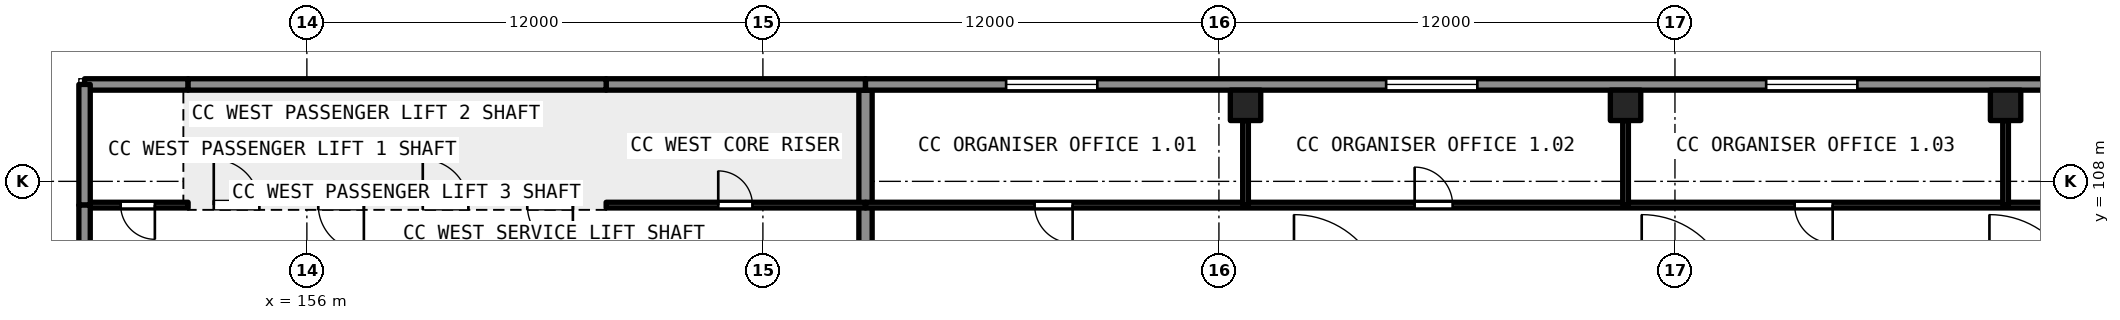
"""IFC4 building model, lengths in metres.
Left out: names, types, materials, properties, quantities, classifications, styles, units other than length and angle.
Written with IfcOpenShell. Run it as: python <this file> out.ifc"""

import sys

from ifc_helpers import new_model, si_unit, direction, frame, frame_2d, origin, origin_2d, place, context, subcontext, project, spatial, rectangle, extrude, element, fill, save


model = new_model("IFC4")
c1 = context("Model", 3, precision=1e-05, world=origin(), true_north=direction((0.0, 1.0)))
c2 = subcontext(c1, "Body", "Model", "MODEL_VIEW")
j1 = project(units=[si_unit("LENGTHUNIT", "METRE"), si_unit("PLANEANGLEUNIT", "RADIAN")], contexts=[c1])
p1 = place(None, origin())
s1 = spatial("IfcSite", under=j1, at=p1, CompositionType="ELEMENT")
p2 = place(p1, origin())
s2 = spatial("IfcBuilding", under=s1, at=p2, CompositionType="ELEMENT")
p3 = place(p2, frame((0.0, 0.0, 9.0)))
s3 = spatial("IfcBuildingStorey", under=s2, at=p3, CompositionType="ELEMENT", Elevation=9.0)
for number, where, z_axis, x_axis in (
    (1, (180.7, 110.0, 0.0), (0.0, 0.0, 1.0), (1.0, 0.0, 0.0)),
    (2, (190.7, 110.0, 0.0), (0.0, 0.0, 1.0), (1.0, 0.0, 0.0)),
    (3, (200.7, 110.0, 0.0), (0.0, 0.0, 1.0), (1.0, 0.0, 0.0)),
):
    element("IfcColumn", number, at=place(p3, frame(where, z_axis=z_axis, x_axis=x_axis)), inside=s3, PredefinedType="COLUMN", context=c2, shape_type="SweptSolid", body=[
        extrude(rectangle(XDim=0.8, YDim=0.8, at=origin_2d()), origin(), (0.0, 0.0, 1.0), 6.0),
    ])
p4 = place(p3, frame((170.7, 103.15, 0.0), z_axis=(0.0, 0.0, 1.0), x_axis=(0.0, 1.0, 0.0)))
e4 = element("IfcWall", 4, at=p4, inside=s3, PredefinedType="SHEAR", context=c2, shape_type="SweptSolid", body=[
    extrude(rectangle(XDim=7.25, YDim=0.35, at=frame_2d((3.625, 0.0))), origin(), (0.0, 0.0, 1.0), 5.59),
])
p5 = place(p4, frame((1.2, 0.0, 0.0)))
e5 = element("IfcOpeningElement", 5, at=p5, cuts=e4, PredefinedType="OPENING", context=c2, shape_type="SweptSolid", body=[
    extrude(rectangle(XDim=1.8, YDim=2.1, at=frame_2d((0.9, 1.05))), frame((0.0, 0.186, 0.0), z_axis=(0.0, -1.0, 0.0), x_axis=(1.0, 0.0, 0.0)), (0.0, 0.0, 1.0), 0.371),
])
p6 = place(p2, origin())
s4 = spatial("IfcBuildingStorey", under=s2, at=p6, CompositionType="ELEMENT", Elevation=0.0)
for number, where, z_axis, x_axis in (
    (6, (152.875, 107.375, -1.2), (0.0, 0.0, 1.0), (0.0, 1.0, 0.0)),
    (7, (155.625, 107.375, -1.2), (0.0, 0.0, 1.0), (0.0, 1.0, 0.0)),
    (8, (158.375, 107.375, -1.2), (0.0, 0.0, 1.0), (0.0, 1.0, 0.0)),
    (9, (161.125, 107.375, -1.2), (0.0, 0.0, 1.0), (0.0, 1.0, 0.0)),
    (10, (163.875, 107.375, -1.2), (0.0, 0.0, 1.0), (0.0, 1.0, 0.0)),
):
    element("IfcWall", number, at=place(p6, frame(where, z_axis=z_axis, x_axis=x_axis)), inside=s4, PredefinedType="SHEAR", context=c2, shape_type="SweptSolid", body=[
        extrude(rectangle(XDim=3.025, YDim=0.25, at=frame_2d((1.512, 0.0))), origin(), (0.0, 0.0, 1.0), 30.79),
    ])
p7 = place(p6, frame((163.875, 107.375, -1.2), z_axis=(0.0, 0.0, 1.0), x_axis=(-1.0, 0.0, 0.0)))
e11 = element("IfcWall", 11, at=p7, inside=s4, PredefinedType="SHEAR", context=c2, shape_type="SweptSolid", body=[
    extrude(rectangle(XDim=11.0, YDim=0.25, at=frame_2d((5.5, 0.0))), origin(), (0.0, 0.0, 1.0), 30.79),
])
p8 = place(p7, frame((9.125, 0.0, 1.2)))
e12 = element("IfcOpeningElement", 12, at=p8, cuts=e11, PredefinedType="OPENING", context=c2, shape_type="SweptSolid", body=[
    extrude(rectangle(XDim=1.2, YDim=2.1, at=frame_2d((0.6, 1.05))), frame((0.0, 0.135, 0.0), z_axis=(0.0, -1.0, 0.0), x_axis=(1.0, 0.0, 0.0)), (0.0, 0.0, 1.0), 0.271),
])
p9 = place(p7, frame((6.375, 0.0, 1.2)))
e13 = element("IfcOpeningElement", 13, at=p9, cuts=e11, PredefinedType="OPENING", context=c2, shape_type="SweptSolid", body=[
    extrude(rectangle(XDim=1.2, YDim=2.1, at=frame_2d((0.6, 1.05))), frame((0.0, 0.135, 0.0), z_axis=(0.0, -1.0, 0.0), x_axis=(1.0, 0.0, 0.0)), (0.0, 0.0, 1.0), 0.271),
])
p10 = place(p7, frame((3.625, 0.0, 1.2)))
e14 = element("IfcOpeningElement", 14, at=p10, cuts=e11, PredefinedType="OPENING", context=c2, shape_type="SweptSolid", body=[
    extrude(rectangle(XDim=1.2, YDim=2.1, at=frame_2d((0.6, 1.05))), frame((0.0, 0.135, 0.0), z_axis=(0.0, -1.0, 0.0), x_axis=(1.0, 0.0, 0.0)), (0.0, 0.0, 1.0), 0.271),
])
p11 = place(p7, frame((0.875, 0.0, 1.2)))
e15 = element("IfcOpeningElement", 15, at=p11, cuts=e11, PredefinedType="OPENING", context=c2, shape_type="SweptSolid", body=[
    extrude(rectangle(XDim=1.2, YDim=2.1, at=frame_2d((0.6, 1.05))), frame((0.0, 0.135, 0.0), z_axis=(0.0, -1.0, 0.0), x_axis=(1.0, 0.0, 0.0)), (0.0, 0.0, 1.0), 0.271),
])
p12 = place(p7, frame((9.125, 0.0, 10.2)))
e16 = element("IfcOpeningElement", 16, at=p12, cuts=e11, PredefinedType="OPENING", context=c2, shape_type="SweptSolid", body=[
    extrude(rectangle(XDim=1.2, YDim=2.1, at=frame_2d((0.6, 1.05))), frame((0.0, 0.135, 0.0), z_axis=(0.0, -1.0, 0.0), x_axis=(1.0, 0.0, 0.0)), (0.0, 0.0, 1.0), 0.271),
])
p13 = place(p7, frame((6.375, 0.0, 10.2)))
e17 = element("IfcOpeningElement", 17, at=p13, cuts=e11, PredefinedType="OPENING", context=c2, shape_type="SweptSolid", body=[
    extrude(rectangle(XDim=1.2, YDim=2.1, at=frame_2d((0.6, 1.05))), frame((0.0, 0.135, 0.0), z_axis=(0.0, -1.0, 0.0), x_axis=(1.0, 0.0, 0.0)), (0.0, 0.0, 1.0), 0.271),
])
p14 = place(p7, frame((3.625, 0.0, 10.2)))
e18 = element("IfcOpeningElement", 18, at=p14, cuts=e11, PredefinedType="OPENING", context=c2, shape_type="SweptSolid", body=[
    extrude(rectangle(XDim=1.2, YDim=2.1, at=frame_2d((0.6, 1.05))), frame((0.0, 0.135, 0.0), z_axis=(0.0, -1.0, 0.0), x_axis=(1.0, 0.0, 0.0)), (0.0, 0.0, 1.0), 0.271),
])
p15 = place(p7, frame((0.875, 0.0, 10.2)))
e19 = element("IfcOpeningElement", 19, at=p15, cuts=e11, PredefinedType="OPENING", context=c2, shape_type="SweptSolid", body=[
    extrude(rectangle(XDim=1.2, YDim=2.1, at=frame_2d((0.6, 1.05))), frame((0.0, 0.135, 0.0), z_axis=(0.0, -1.0, 0.0), x_axis=(1.0, 0.0, 0.0)), (0.0, 0.0, 1.0), 0.271),
])
p16 = place(p7, frame((9.125, 0.0, 16.2)))
e20 = element("IfcOpeningElement", 20, at=p16, cuts=e11, PredefinedType="OPENING", context=c2, shape_type="SweptSolid", body=[
    extrude(rectangle(XDim=1.2, YDim=2.1, at=frame_2d((0.6, 1.05))), frame((0.0, 0.135, 0.0), z_axis=(0.0, -1.0, 0.0), x_axis=(1.0, 0.0, 0.0)), (0.0, 0.0, 1.0), 0.271),
])
p17 = place(p7, frame((6.375, 0.0, 16.2)))
e21 = element("IfcOpeningElement", 21, at=p17, cuts=e11, PredefinedType="OPENING", context=c2, shape_type="SweptSolid", body=[
    extrude(rectangle(XDim=1.2, YDim=2.1, at=frame_2d((0.6, 1.05))), frame((0.0, 0.135, 0.0), z_axis=(0.0, -1.0, 0.0), x_axis=(1.0, 0.0, 0.0)), (0.0, 0.0, 1.0), 0.271),
])
p18 = place(p7, frame((3.625, 0.0, 16.2)))
e22 = element("IfcOpeningElement", 22, at=p18, cuts=e11, PredefinedType="OPENING", context=c2, shape_type="SweptSolid", body=[
    extrude(rectangle(XDim=1.2, YDim=2.1, at=frame_2d((0.6, 1.05))), frame((0.0, 0.135, 0.0), z_axis=(0.0, -1.0, 0.0), x_axis=(1.0, 0.0, 0.0)), (0.0, 0.0, 1.0), 0.271),
])
p19 = place(p7, frame((0.875, 0.0, 16.2)))
e23 = element("IfcOpeningElement", 23, at=p19, cuts=e11, PredefinedType="OPENING", context=c2, shape_type="SweptSolid", body=[
    extrude(rectangle(XDim=1.2, YDim=2.1, at=frame_2d((0.6, 1.05))), frame((0.0, 0.135, 0.0), z_axis=(0.0, -1.0, 0.0), x_axis=(1.0, 0.0, 0.0)), (0.0, 0.0, 1.0), 0.271),
])
p20 = place(p7, frame((9.125, 0.0, 21.6)))
e24 = element("IfcOpeningElement", 24, at=p20, cuts=e11, PredefinedType="OPENING", context=c2, shape_type="SweptSolid", body=[
    extrude(rectangle(XDim=1.2, YDim=2.1, at=frame_2d((0.6, 1.05))), frame((0.0, 0.135, 0.0), z_axis=(0.0, -1.0, 0.0), x_axis=(1.0, 0.0, 0.0)), (0.0, 0.0, 1.0), 0.271),
])
p21 = place(p7, frame((6.375, 0.0, 21.6)))
e25 = element("IfcOpeningElement", 25, at=p21, cuts=e11, PredefinedType="OPENING", context=c2, shape_type="SweptSolid", body=[
    extrude(rectangle(XDim=1.2, YDim=2.1, at=frame_2d((0.6, 1.05))), frame((0.0, 0.135, 0.0), z_axis=(0.0, -1.0, 0.0), x_axis=(1.0, 0.0, 0.0)), (0.0, 0.0, 1.0), 0.271),
])
p22 = place(p7, frame((3.625, 0.0, 21.6)))
e26 = element("IfcOpeningElement", 26, at=p22, cuts=e11, PredefinedType="OPENING", context=c2, shape_type="SweptSolid", body=[
    extrude(rectangle(XDim=1.2, YDim=2.1, at=frame_2d((0.6, 1.05))), frame((0.0, 0.135, 0.0), z_axis=(0.0, -1.0, 0.0), x_axis=(1.0, 0.0, 0.0)), (0.0, 0.0, 1.0), 0.271),
])
p23 = place(p7, frame((0.875, 0.0, 21.6)))
e27 = element("IfcOpeningElement", 27, at=p23, cuts=e11, PredefinedType="OPENING", context=c2, shape_type="SweptSolid", body=[
    extrude(rectangle(XDim=1.2, YDim=2.1, at=frame_2d((0.6, 1.05))), frame((0.0, 0.135, 0.0), z_axis=(0.0, -1.0, 0.0), x_axis=(1.0, 0.0, 0.0)), (0.0, 0.0, 1.0), 0.271),
])
p24 = place(p7, frame((9.125, 0.0, 26.6)))
e28 = element("IfcOpeningElement", 28, at=p24, cuts=e11, PredefinedType="OPENING", context=c2, shape_type="SweptSolid", body=[
    extrude(rectangle(XDim=1.2, YDim=2.1, at=frame_2d((0.6, 1.05))), frame((0.0, 0.135, 0.0), z_axis=(0.0, -1.0, 0.0), x_axis=(1.0, 0.0, 0.0)), (0.0, 0.0, 1.0), 0.271),
])
p25 = place(p7, frame((6.375, 0.0, 26.6)))
e29 = element("IfcOpeningElement", 29, at=p25, cuts=e11, PredefinedType="OPENING", context=c2, shape_type="SweptSolid", body=[
    extrude(rectangle(XDim=1.2, YDim=2.1, at=frame_2d((0.6, 1.05))), frame((0.0, 0.135, 0.0), z_axis=(0.0, -1.0, 0.0), x_axis=(1.0, 0.0, 0.0)), (0.0, 0.0, 1.0), 0.271),
])
p26 = place(p7, frame((3.625, 0.0, 26.6)))
e30 = element("IfcOpeningElement", 30, at=p26, cuts=e11, PredefinedType="OPENING", context=c2, shape_type="SweptSolid", body=[
    extrude(rectangle(XDim=1.2, YDim=2.1, at=frame_2d((0.6, 1.05))), frame((0.0, 0.135, 0.0), z_axis=(0.0, -1.0, 0.0), x_axis=(1.0, 0.0, 0.0)), (0.0, 0.0, 1.0), 0.271),
])
p27 = place(p7, frame((0.875, 0.0, 26.6)))
e31 = element("IfcOpeningElement", 31, at=p27, cuts=e11, PredefinedType="OPENING", context=c2, shape_type="SweptSolid", body=[
    extrude(rectangle(XDim=1.2, YDim=2.1, at=frame_2d((0.6, 1.05))), frame((0.0, 0.135, 0.0), z_axis=(0.0, -1.0, 0.0), x_axis=(1.0, 0.0, 0.0)), (0.0, 0.0, 1.0), 0.271),
])
p28 = place(p6, frame((152.875, 110.275, -1.2), z_axis=(0.0, 0.0, 1.0), x_axis=(1.0, 0.0, 0.0)))
e32 = element("IfcWall", 32, at=p28, inside=s4, PredefinedType="SHEAR", context=c2, shape_type="SweptSolid", body=[
    extrude(rectangle(XDim=11.0, YDim=0.25, at=frame_2d((5.5, 0.0))), origin(), (0.0, 0.0, 1.0), 30.79),
])
p29 = place(p3, frame((150.3, 107.375, 0.0), z_axis=(0.0, 0.0, 1.0), x_axis=(1.0, 0.0, 0.0)))
e33 = element("IfcWall", 33, at=p29, inside=s3, PredefinedType="PARTITIONING", context=c2, shape_type="SweptSolid", body=[
    extrude(rectangle(XDim=2.575, YDim=0.15, at=frame_2d((1.288, 0.0))), origin(), (0.0, 0.0, 1.0), 5.59),
])
p30 = place(p29, frame((0.8, 0.0, 0.0)))
e34 = element("IfcOpeningElement", 34, at=p30, cuts=e33, PredefinedType="OPENING", context=c2, shape_type="SweptSolid", body=[
    extrude(rectangle(XDim=0.9, YDim=2.1, at=frame_2d((0.45, 1.05))), frame((0.0, 0.085, 0.0), z_axis=(0.0, -1.0, 0.0), x_axis=(1.0, 0.0, 0.0)), (0.0, 0.0, 1.0), 0.171),
])
p31 = place(p3, frame((150.15, 110.55, 0.0), z_axis=(0.0, 0.0, 1.0), x_axis=(1.0, 0.0, 0.0)))
e35 = element("IfcWall", 35, at=p31, inside=s3, PredefinedType="SOLIDWALL", context=c2, shape_type="SweptSolid", body=[
    extrude(rectangle(XDim=2.725, YDim=0.3, at=frame_2d((1.363, 0.0))), origin(), (0.0, 0.0, 1.0), 5.59),
])
p32 = place(p3, frame((150.15, 107.375, 0.0), z_axis=(0.0, 0.0, 1.0), x_axis=(0.0, 1.0, 0.0)))
e36 = element("IfcWall", 36, at=p32, inside=s3, PredefinedType="SOLIDWALL", context=c2, shape_type="SweptSolid", body=[
    extrude(rectangle(XDim=3.175, YDim=0.3, at=frame_2d((1.587, 0.0))), origin(), (0.0, 0.0, 1.0), 5.59),
])
p33 = place(p3, frame((163.875, 107.375, 0.0), z_axis=(0.0, 0.0, 1.0), x_axis=(1.0, 0.0, 0.0)))
e37 = element("IfcWall", 37, at=p33, inside=s3, PredefinedType="PARTITIONING", context=c2, shape_type="SweptSolid", body=[
    extrude(rectangle(XDim=6.825, YDim=0.15, at=frame_2d((3.413, 0.0))), origin(), (0.0, 0.0, 1.0), 5.59),
])
p34 = place(p33, frame((2.95, 0.0, 0.0)))
e38 = element("IfcOpeningElement", 38, at=p34, cuts=e37, PredefinedType="OPENING", context=c2, shape_type="SweptSolid", body=[
    extrude(rectangle(XDim=0.9, YDim=2.1, at=frame_2d((0.45, 1.05))), frame((0.0, 0.085, 0.0), z_axis=(0.0, -1.0, 0.0), x_axis=(1.0, 0.0, 0.0)), (0.0, 0.0, 1.0), 0.171),
])
p35 = place(p3, frame((163.875, 110.55, 0.0), z_axis=(0.0, 0.0, 1.0), x_axis=(1.0, 0.0, 0.0)))
e39 = element("IfcWall", 39, at=p35, inside=s3, PredefinedType="SOLIDWALL", context=c2, shape_type="SweptSolid", body=[
    extrude(rectangle(XDim=6.825, YDim=0.3, at=frame_2d((3.413, 0.0))), origin(), (0.0, 0.0, 1.0), 5.59),
])
p36 = place(p3, frame((150.15, 103.15, 0.0), z_axis=(0.0, 0.0, 1.0), x_axis=(0.0, 1.0, 0.0)))
e40 = element("IfcWall", 40, at=p36, inside=s3, PredefinedType="SOLIDWALL", context=c2, shape_type="SweptSolid", body=[
    extrude(rectangle(XDim=4.225, YDim=0.3, at=frame_2d((2.113, 0.0))), origin(), (0.0, 0.0, 1.0), 5.59),
])
p37 = place(p3, frame((152.875, 110.55, 0.0), z_axis=(0.0, 0.0, 1.0), x_axis=(1.0, 0.0, 0.0)))
e41 = element("IfcWall", 41, at=p37, inside=s3, PredefinedType="SOLIDWALL", context=c2, shape_type="SweptSolid", body=[
    extrude(rectangle(XDim=11.0, YDim=0.3, at=frame_2d((5.5, 0.0))), origin(), (0.0, 0.0, 1.0), 5.59),
])
p38 = place(p3, frame((170.7, 110.55, 0.0), z_axis=(0.0, 0.0, 1.0), x_axis=(1.0, 0.0, 0.0)))
e42 = element("IfcWall", 42, at=p38, inside=s3, PredefinedType="SOLIDWALL", context=c2, shape_type="SweptSolid", body=[
    extrude(rectangle(XDim=50.0, YDim=0.3, at=frame_2d((25.0, 0.0))), origin(), (0.0, 0.0, 1.0), 5.59),
])
p39 = place(p38, frame((3.7, 0.0, 0.9)))
e43 = element("IfcOpeningElement", 43, at=p39, cuts=e42, PredefinedType="OPENING", context=c2, shape_type="SweptSolid", body=[
    extrude(rectangle(XDim=2.4, YDim=1.8, at=frame_2d((1.2, 0.9))), frame((0.0, 0.161, 0.0), z_axis=(0.0, -1.0, 0.0), x_axis=(1.0, 0.0, 0.0)), (0.0, 0.0, 1.0), 0.321),
])
p40 = place(p38, frame((13.7, 0.0, 0.9)))
e44 = element("IfcOpeningElement", 44, at=p40, cuts=e42, PredefinedType="OPENING", context=c2, shape_type="SweptSolid", body=[
    extrude(rectangle(XDim=2.4, YDim=1.8, at=frame_2d((1.2, 0.9))), frame((0.0, 0.161, 0.0), z_axis=(0.0, -1.0, 0.0), x_axis=(1.0, 0.0, 0.0)), (0.0, 0.0, 1.0), 0.321),
])
p41 = place(p38, frame((23.7, 0.0, 0.9)))
e45 = element("IfcOpeningElement", 45, at=p41, cuts=e42, PredefinedType="OPENING", context=c2, shape_type="SweptSolid", body=[
    extrude(rectangle(XDim=2.4, YDim=1.8, at=frame_2d((1.2, 0.9))), frame((0.0, 0.161, 0.0), z_axis=(0.0, -1.0, 0.0), x_axis=(1.0, 0.0, 0.0)), (0.0, 0.0, 1.0), 0.321),
])
p42 = place(p38, frame((33.7, 0.0, 0.9)))
e46 = element("IfcOpeningElement", 46, at=p42, cuts=e42, PredefinedType="OPENING", context=c2, shape_type="SweptSolid", body=[
    extrude(rectangle(XDim=2.4, YDim=1.8, at=frame_2d((1.2, 0.9))), frame((0.0, 0.161, 0.0), z_axis=(0.0, -1.0, 0.0), x_axis=(1.0, 0.0, 0.0)), (0.0, 0.0, 1.0), 0.321),
])
p43 = place(p38, frame((43.7, 0.0, 0.9)))
e47 = element("IfcOpeningElement", 47, at=p43, cuts=e42, PredefinedType="OPENING", context=c2, shape_type="SweptSolid", body=[
    extrude(rectangle(XDim=2.4, YDim=1.8, at=frame_2d((1.2, 0.9))), frame((0.0, 0.161, 0.0), z_axis=(0.0, -1.0, 0.0), x_axis=(1.0, 0.0, 0.0)), (0.0, 0.0, 1.0), 0.321),
])
p44 = place(p3, frame((220.7, 107.375, 0.0), z_axis=(0.0, 0.0, 1.0), x_axis=(-1.0, 0.0, 0.0)))
e48 = element("IfcWall", 48, at=p44, inside=s3, PredefinedType="PARTITIONING", context=c2, shape_type="SweptSolid", body=[
    extrude(rectangle(XDim=50.0, YDim=0.15, at=frame_2d((25.0, 0.0))), origin(), (0.0, 0.0, 1.0), 5.59),
])
p45 = place(p44, frame((44.55, 0.0, 0.0)))
e49 = element("IfcOpeningElement", 49, at=p45, cuts=e48, PredefinedType="OPENING", context=c2, shape_type="SweptSolid", body=[
    extrude(rectangle(XDim=1.0, YDim=2.1, at=frame_2d((0.5, 1.05))), frame((0.0, 0.085, 0.0), z_axis=(0.0, -1.0, 0.0), x_axis=(1.0, 0.0, 0.0)), (0.0, 0.0, 1.0), 0.171),
])
p46 = place(p44, frame((34.55, 0.0, 0.0)))
e50 = element("IfcOpeningElement", 50, at=p46, cuts=e48, PredefinedType="OPENING", context=c2, shape_type="SweptSolid", body=[
    extrude(rectangle(XDim=1.0, YDim=2.1, at=frame_2d((0.5, 1.05))), frame((0.0, 0.085, 0.0), z_axis=(0.0, -1.0, 0.0), x_axis=(1.0, 0.0, 0.0)), (0.0, 0.0, 1.0), 0.171),
])
p47 = place(p44, frame((24.55, 0.0, 0.0)))
e51 = element("IfcOpeningElement", 51, at=p47, cuts=e48, PredefinedType="OPENING", context=c2, shape_type="SweptSolid", body=[
    extrude(rectangle(XDim=1.0, YDim=2.1, at=frame_2d((0.5, 1.05))), frame((0.0, 0.085, 0.0), z_axis=(0.0, -1.0, 0.0), x_axis=(1.0, 0.0, 0.0)), (0.0, 0.0, 1.0), 0.171),
])
p48 = place(p44, frame((14.55, 0.0, 0.0)))
e52 = element("IfcOpeningElement", 52, at=p48, cuts=e48, PredefinedType="OPENING", context=c2, shape_type="SweptSolid", body=[
    extrude(rectangle(XDim=1.0, YDim=2.1, at=frame_2d((0.5, 1.05))), frame((0.0, 0.085, 0.0), z_axis=(0.0, -1.0, 0.0), x_axis=(1.0, 0.0, 0.0)), (0.0, 0.0, 1.0), 0.171),
])
p49 = place(p44, frame((4.55, 0.0, 0.0)))
e53 = element("IfcOpeningElement", 53, at=p49, cuts=e48, PredefinedType="OPENING", context=c2, shape_type="SweptSolid", body=[
    extrude(rectangle(XDim=1.0, YDim=2.1, at=frame_2d((0.5, 1.05))), frame((0.0, 0.085, 0.0), z_axis=(0.0, -1.0, 0.0), x_axis=(1.0, 0.0, 0.0)), (0.0, 0.0, 1.0), 0.171),
])
for number, where, z_axis, x_axis in (
    (54, (180.7, 107.375, 0.0), (0.0, 0.0, 1.0), (0.0, 1.0, 0.0)),
    (55, (190.7, 107.375, 0.0), (0.0, 0.0, 1.0), (0.0, 1.0, 0.0)),
    (56, (200.7, 107.375, 0.0), (0.0, 0.0, 1.0), (0.0, 1.0, 0.0)),
):
    element("IfcWall", number, at=place(p3, frame(where, z_axis=z_axis, x_axis=x_axis)), inside=s3, PredefinedType="PARTITIONING", context=c2, shape_type="SweptSolid", body=[
        extrude(rectangle(XDim=2.225, YDim=0.15, at=frame_2d((1.113, 0.0))), origin(), (0.0, 0.0, 1.0), 5.59),
    ])
p50 = place(p45, origin())
e57 = element("IfcDoor", 57, at=p50, inside=s3, OperationType="SINGLE_SWING_LEFT", PredefinedType="DOOR", context=c2, shape_type="SweptSolid", body=[
    extrude(rectangle(XDim=1.0, YDim=2.1, at=frame_2d((0.5, 1.05))), frame((0.0, 0.025, 0.0), z_axis=(0.0, -1.0, 0.0), x_axis=(1.0, 0.0, 0.0)), (0.0, 0.0, 1.0), 0.05),
])
fill(e49, e57)
p51 = place(p46, origin())
e58 = element("IfcDoor", 58, at=p51, inside=s3, OperationType="SINGLE_SWING_RIGHT", PredefinedType="DOOR", context=c2, shape_type="SweptSolid", body=[
    extrude(rectangle(XDim=1.0, YDim=2.1, at=frame_2d((0.5, 1.05))), frame((0.0, 0.025, 0.0), z_axis=(0.0, -1.0, 0.0), x_axis=(1.0, 0.0, 0.0)), (0.0, 0.0, 1.0), 0.05),
])
fill(e50, e58)
p52 = place(p47, origin())
e59 = element("IfcDoor", 59, at=p52, inside=s3, OperationType="SINGLE_SWING_LEFT", PredefinedType="DOOR", context=c2, shape_type="SweptSolid", body=[
    extrude(rectangle(XDim=1.0, YDim=2.1, at=frame_2d((0.5, 1.05))), frame((0.0, 0.025, 0.0), z_axis=(0.0, -1.0, 0.0), x_axis=(1.0, 0.0, 0.0)), (0.0, 0.0, 1.0), 0.05),
])
fill(e51, e59)
p53 = place(p12, origin())
e60 = element("IfcDoor", 60, at=p53, inside=s3, OperationType="SLIDING_TO_RIGHT", PredefinedType="DOOR", context=c2, shape_type="SweptSolid", body=[
    extrude(rectangle(XDim=1.2, YDim=2.1, at=frame_2d((0.6, 1.05))), frame((0.0, 0.025, 0.0), z_axis=(0.0, -1.0, 0.0), x_axis=(1.0, 0.0, 0.0)), (0.0, 0.0, 1.0), 0.05),
])
fill(e16, e60)
p54 = place(p13, origin())
e61 = element("IfcDoor", 61, at=p54, inside=s3, OperationType="SLIDING_TO_LEFT", PredefinedType="DOOR", context=c2, shape_type="SweptSolid", body=[
    extrude(rectangle(XDim=1.2, YDim=2.1, at=frame_2d((0.6, 1.05))), frame((0.0, 0.025, 0.0), z_axis=(0.0, -1.0, 0.0), x_axis=(1.0, 0.0, 0.0)), (0.0, 0.0, 1.0), 0.05),
])
fill(e17, e61)
p55 = place(p14, origin())
e62 = element("IfcDoor", 62, at=p55, inside=s3, OperationType="SLIDING_TO_RIGHT", PredefinedType="DOOR", context=c2, shape_type="SweptSolid", body=[
    extrude(rectangle(XDim=1.2, YDim=2.1, at=frame_2d((0.6, 1.05))), frame((0.0, 0.025, 0.0), z_axis=(0.0, -1.0, 0.0), x_axis=(1.0, 0.0, 0.0)), (0.0, 0.0, 1.0), 0.05),
])
fill(e18, e62)
p56 = place(p15, origin())
e63 = element("IfcDoor", 63, at=p56, inside=s3, OperationType="SLIDING_TO_LEFT", PredefinedType="DOOR", context=c2, shape_type="SweptSolid", body=[
    extrude(rectangle(XDim=1.2, YDim=2.1, at=frame_2d((0.6, 1.05))), frame((0.0, 0.025, 0.0), z_axis=(0.0, -1.0, 0.0), x_axis=(1.0, 0.0, 0.0)), (0.0, 0.0, 1.0), 0.05),
])
fill(e19, e63)
p57 = place(p30, origin())
e64 = element("IfcDoor", 64, at=p57, inside=s3, OperationType="SINGLE_SWING_RIGHT", PredefinedType="DOOR", context=c2, shape_type="SweptSolid", body=[
    extrude(rectangle(XDim=0.9, YDim=2.1, at=frame_2d((0.45, 1.05))), frame((0.0, 0.025, 0.0), z_axis=(0.0, -1.0, 0.0), x_axis=(1.0, 0.0, 0.0)), (0.0, 0.0, 1.0), 0.05),
])
fill(e34, e64)
p58 = place(p34, origin())
e65 = element("IfcDoor", 65, at=p58, inside=s3, OperationType="SINGLE_SWING_LEFT", PredefinedType="DOOR", context=c2, shape_type="SweptSolid", body=[
    extrude(rectangle(XDim=0.9, YDim=2.1, at=frame_2d((0.45, 1.05))), frame((0.0, 0.025, 0.0), z_axis=(0.0, -1.0, 0.0), x_axis=(1.0, 0.0, 0.0)), (0.0, 0.0, 1.0), 0.05),
])
fill(e38, e65)
p59 = place(p39, origin())
e66 = element("IfcWindow", 66, at=p59, inside=s3, PartitioningType="DOUBLE_PANEL_VERTICAL", PredefinedType="WINDOW", context=c2, shape_type="SweptSolid", body=[
    extrude(rectangle(XDim=2.4, YDim=1.8, at=frame_2d((1.2, 0.9))), frame((0.0, 0.03, 0.0), z_axis=(0.0, -1.0, 0.0), x_axis=(1.0, 0.0, 0.0)), (0.0, 0.0, 1.0), 0.06),
])
fill(e43, e66)
p60 = place(p40, origin())
e67 = element("IfcWindow", 67, at=p60, inside=s3, PartitioningType="DOUBLE_PANEL_VERTICAL", PredefinedType="WINDOW", context=c2, shape_type="SweptSolid", body=[
    extrude(rectangle(XDim=2.4, YDim=1.8, at=frame_2d((1.2, 0.9))), frame((0.0, 0.03, 0.0), z_axis=(0.0, -1.0, 0.0), x_axis=(1.0, 0.0, 0.0)), (0.0, 0.0, 1.0), 0.06),
])
fill(e44, e67)
p61 = place(p41, origin())
e68 = element("IfcWindow", 68, at=p61, inside=s3, PartitioningType="DOUBLE_PANEL_VERTICAL", PredefinedType="WINDOW", context=c2, shape_type="SweptSolid", body=[
    extrude(rectangle(XDim=2.4, YDim=1.8, at=frame_2d((1.2, 0.9))), frame((0.0, 0.03, 0.0), z_axis=(0.0, -1.0, 0.0), x_axis=(1.0, 0.0, 0.0)), (0.0, 0.0, 1.0), 0.06),
])
fill(e45, e68)
save(model, sys.argv[1])
